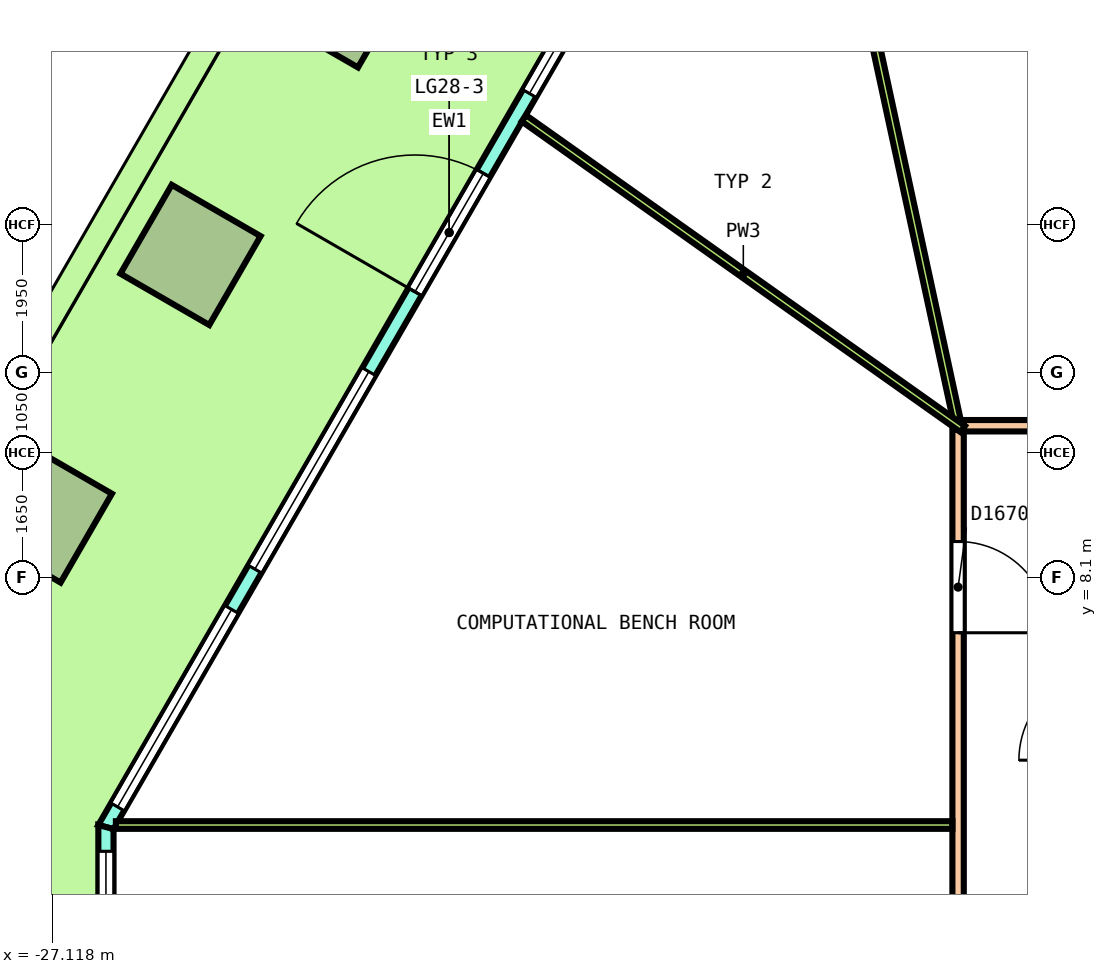
"""IFC4 building model, lengths in metres.
Left out: names, types, materials, properties, quantities, classifications, styles, units other than length and angle.
Written with IfcOpenShell. Run it as: python <this file> out.ifc"""

import sys

from ifc_helpers import new_model, si_unit, direction, frame, frame_2d, origin, origin_2d, place, context, subcontext, project, spatial, polyline, rectangle, outline, extrude, element, fill, save


model = new_model("IFC4")
c1 = context("Model", 3, precision=1e-05, world=origin(), true_north=direction((0.0, 1.0)))
c2 = subcontext(c1, "Body", "Model", "MODEL_VIEW")
j1 = project(units=[si_unit("LENGTHUNIT", "METRE"), si_unit("PLANEANGLEUNIT", "RADIAN")], contexts=[c1])
p1 = place(None, origin())
s1 = spatial("IfcSite", under=j1, at=p1, CompositionType="ELEMENT")
p2 = place(p1, origin())
s2 = spatial("IfcBuilding", under=s1, at=p2, CompositionType="ELEMENT")
p3 = place(p2, frame((0.0, 0.0, 130.8)))
s3 = spatial("IfcBuildingStorey", under=s2, at=p3, CompositionType="ELEMENT", Elevation=130.8)
for number, where, z_axis, x_axis in (
    (1, (-23.342, 15.736, 0.0), (0.0, 0.0, 1.0), (-0.5, -0.866, 0.0)),
    (2, (-25.299, 12.347, 0.0), (0.0, 0.0, 1.0), (-0.5, -0.866, 0.0)),
    (3, (-27.255, 8.959, 0.0), (0.0, 0.0, 1.0), (-0.5, -0.866, 0.0)),
):
    element("IfcColumn", number, at=place(p3, frame(where, z_axis=z_axis, x_axis=x_axis)), inside=s3, PredefinedType="COLUMN", context=c2, shape_type="SweptSolid", body=[
        extrude(rectangle(XDim=1.35, YDim=1.35, at=origin_2d()), origin(), (0.0, 0.0, 1.0), 4.04),
    ])
p4 = place(p3, frame((-17.38, 20.463, 0.0), z_axis=(0.0, 0.0, 1.0), x_axis=(-0.500000137386, -0.866025324465, 0.0)))
e4 = element("IfcWall", 4, at=p4, inside=s3, PredefinedType="SOLIDWALL", context=c2, shape_type="SweptSolid", body=[
    extrude(outline(polyline([(-0.027, -0.1), (0.979, -0.1), (1.986, -0.1), (2.992, -0.1), (3.999, -0.1), (5.005, -0.1), (6.012, -0.1), (7.018, -0.1), (8.025, -0.1), (9.031, -0.1), (10.038, -0.1), (11.044, -0.1), (12.051, -0.1), (13.057, -0.1), (14.063, -0.1), (15.07, -0.1), (16.076, -0.1), (17.083, -0.1), (18.089, -0.1), (18.036, 0.1), (17.035, 0.1), (16.035, 0.1), (15.034, 0.1), (14.034, 0.1), (13.033, 0.1), (12.033, 0.1), (11.032, 0.1), (10.032, 0.1), (9.031, 0.1), (8.031, 0.1), (7.03, 0.1), (6.03, 0.1), (5.029, 0.1), (4.029, 0.1), (3.028, 0.1), (2.028, 0.1), (1.027, 0.1), (0.027, 0.1), (-0.027, -0.1)])), origin(), (0.0, 0.0, 1.0), 4.1),
])
p5 = place(p4, frame((0.306, 0.0, 0.1)))
e5 = element("IfcOpeningElement", 5, at=p5, cuts=e4, PredefinedType="OPENING", context=c2, shape_type="SweptSolid", body=[
    extrude(rectangle(XDim=3.0, YDim=2.9, at=frame_2d((1.5, 1.45))), frame((0.0, 0.11, 0.0), z_axis=(0.0, -1.0, 0.0), x_axis=(1.0, 0.0, 0.0)), (0.0, 0.0, 1.0), 0.22),
])
p6 = place(p4, frame((3.919, 0.0, 0.1)))
e6 = element("IfcOpeningElement", 6, at=p6, cuts=e4, PredefinedType="OPENING", context=c2, shape_type="SweptSolid", body=[
    extrude(rectangle(XDim=3.0, YDim=2.9, at=frame_2d((1.5, 1.45))), frame((0.0, 0.11, 0.0), z_axis=(0.0, -1.0, 0.0), x_axis=(1.0, 0.0, 0.0)), (0.0, 0.0, 1.0), 0.22),
])
p7 = place(p4, frame((8.131, 0.0, 0.0)))
e7 = element("IfcOpeningElement", 7, at=p7, cuts=e4, PredefinedType="OPENING", context=c2, shape_type="SweptSolid", body=[
    extrude(rectangle(XDim=1.8, YDim=2.4, at=frame_2d((0.9, 1.2))), frame((0.0, 0.11, 0.0), z_axis=(0.0, -1.0, 0.0), x_axis=(1.0, 0.0, 0.0)), (0.0, 0.0, 1.0), 0.22),
])
p8 = place(p4, frame((8.131, 0.0, 2.55)))
e8 = element("IfcOpeningElement", 8, at=p8, cuts=e4, PredefinedType="OPENING", context=c2, shape_type="SweptSolid", body=[
    extrude(rectangle(XDim=1.8, YDim=0.45, at=frame_2d((0.9, 0.225))), frame((0.0, 0.11, 0.0), z_axis=(0.0, -1.0, 0.0), x_axis=(1.0, 0.0, 0.0)), (0.0, 0.0, 1.0), 0.22),
])
p9 = place(p4, frame((11.144, 0.0, 0.1)))
e9 = element("IfcOpeningElement", 9, at=p9, cuts=e4, PredefinedType="OPENING", context=c2, shape_type="SweptSolid", body=[
    extrude(rectangle(XDim=3.0, YDim=2.9, at=frame_2d((1.5, 1.45))), frame((0.0, 0.11, 0.0), z_axis=(0.0, -1.0, 0.0), x_axis=(1.0, 0.0, 0.0)), (0.0, 0.0, 1.0), 0.22),
])
p10 = place(p4, frame((14.756, 0.0, 0.1)))
e10 = element("IfcOpeningElement", 10, at=p10, cuts=e4, PredefinedType="OPENING", context=c2, shape_type="SweptSolid", body=[
    extrude(rectangle(XDim=3.0, YDim=2.9, at=frame_2d((1.5, 1.45))), frame((0.0, 0.11, 0.0), z_axis=(0.0, -1.0, 0.0), x_axis=(1.0, 0.0, 0.0)), (0.0, 0.0, 1.0), 0.22),
])
p11 = place(p3, frame((-26.411, 4.82, 0.0), z_axis=(0.0, 0.0, 1.0), x_axis=(0.0, -1.0, 0.0)))
e11 = element("IfcWall", 11, at=p11, inside=s3, PredefinedType="SOLIDWALL", context=c2, shape_type="SweptSolid", body=[
    extrude(outline(polyline([(-0.027, -0.1), (1.128, -0.1), (2.283, -0.1), (3.438, -0.1), (4.592, -0.1), (5.747, -0.1), (6.902, -0.1), (6.848, 0.1), (5.711, 0.1), (4.574, 0.1), (3.438, 0.1), (2.301, 0.1), (1.164, 0.1), (0.027, 0.1), (-0.027, -0.1)])), origin(), (0.0, 0.0, 1.0), 4.1),
])
p12 = place(p11, frame((0.319, 0.0, 0.1)))
e12 = element("IfcOpeningElement", 12, at=p12, cuts=e11, PredefinedType="OPENING", context=c2, shape_type="SweptSolid", body=[
    extrude(rectangle(XDim=2.8, YDim=2.9, at=frame_2d((1.4, 1.45))), frame((0.0, 0.11, 0.0), z_axis=(0.0, -1.0, 0.0), x_axis=(1.0, 0.0, 0.0)), (0.0, 0.0, 1.0), 0.22),
])
p13 = place(p11, frame((3.756, 0.0, 0.1)))
e13 = element("IfcOpeningElement", 13, at=p13, cuts=e11, PredefinedType="OPENING", context=c2, shape_type="SweptSolid", body=[
    extrude(rectangle(XDim=2.8, YDim=2.9, at=frame_2d((1.4, 1.45))), frame((0.0, 0.11, 0.0), z_axis=(0.0, -1.0, 0.0), x_axis=(1.0, 0.0, 0.0)), (0.0, 0.0, 1.0), 0.22),
])
p14 = place(p3, frame((-15.125, 10.1, 0.0), z_axis=(0.0, 0.0, 1.0), x_axis=(1.0, 0.0, 0.0)))
e14 = element("IfcWall", 14, at=p14, inside=s3, PredefinedType="PARTITIONING", context=c2, shape_type="SweptSolid", body=[
    extrude(rectangle(XDim=30.25, YDim=0.15, at=frame_2d((15.125, 0.0))), origin(), (0.0, 0.0, 1.0), 3.05),
])
p15 = place(p14, frame((16.895, 0.0, 0.0)))
e15 = element("IfcOpeningElement", 15, at=p15, cuts=e14, PredefinedType="OPENING", context=c2, shape_type="SweptSolid", body=[
    extrude(rectangle(XDim=1.2, YDim=2.1, at=frame_2d((0.6, 1.05))), frame((0.0, 0.085, 0.0), z_axis=(0.0, -1.0, 0.0), x_axis=(1.0, 0.0, 0.0)), (0.0, 0.0, 1.0), 0.17),
])
p16 = place(p14, frame((6.564, 0.0, 0.0)))
e16 = element("IfcOpeningElement", 16, at=p16, cuts=e14, PredefinedType="OPENING", context=c2, shape_type="SweptSolid", body=[
    extrude(rectangle(XDim=1.2, YDim=2.1, at=frame_2d((0.6, 1.05))), frame((0.0, 0.085, 0.0), z_axis=(0.0, -1.0, 0.0), x_axis=(1.0, 0.0, 0.0)), (0.0, 0.0, 1.0), 0.17),
])
p17 = place(p14, frame((1.476, 0.0, 0.0)))
e17 = element("IfcOpeningElement", 17, at=p17, cuts=e14, PredefinedType="OPENING", context=c2, shape_type="SweptSolid", body=[
    extrude(rectangle(XDim=1.2, YDim=2.1, at=frame_2d((0.6, 1.05))), frame((0.0, 0.085, 0.0), z_axis=(0.0, -1.0, 0.0), x_axis=(1.0, 0.0, 0.0)), (0.0, 0.0, 1.0), 0.17),
])
p18 = place(p3, frame((-15.2, 0.426, 0.0), z_axis=(0.0, 0.0, 1.0), x_axis=(0.0, 1.0, 0.0)))
e18 = element("IfcWall", 18, at=p18, inside=s3, PredefinedType="PARTITIONING", context=c2, shape_type="SweptSolid", body=[
    extrude(rectangle(XDim=9.624, YDim=0.15, at=frame_2d((4.812, 0.0))), origin(), (0.0, 0.0, 1.0), 3.05),
])
p19 = place(p18, frame((6.951, 0.0, 0.0)))
e19 = element("IfcOpeningElement", 19, at=p19, cuts=e18, PredefinedType="OPENING", context=c2, shape_type="SweptSolid", body=[
    extrude(rectangle(XDim=1.2, YDim=2.1, at=frame_2d((0.6, 1.05))), frame((0.0, 0.085, 0.0), z_axis=(0.0, -1.0, 0.0), x_axis=(1.0, 0.0, 0.0)), (0.0, 0.0, 1.0), 0.17),
])
p20 = place(p3, frame((-17.39, 20.245, 0.0), z_axis=(0.0, 0.0, 1.0), x_axis=(0.211012362952, -0.977483392535, 0.0)))
e20 = element("IfcWall", 20, at=p20, inside=s3, PredefinedType="PARTITIONING", context=c2, shape_type="SweptSolid", body=[
    extrude(rectangle(XDim=10.329, YDim=0.1, at=frame_2d((5.164, 0.0))), origin(), (0.0, 0.0, 1.0), 3.05),
])
p21 = place(p20, frame((3.387, 0.0, 0.0)))
e21 = element("IfcOpeningElement", 21, at=p21, cuts=e20, PredefinedType="OPENING", context=c2, shape_type="SweptSolid", body=[
    extrude(rectangle(XDim=1.0, YDim=2.1, at=frame_2d((0.5, 1.05))), frame((0.0, 0.06, 0.0), z_axis=(0.0, -1.0, 0.0), x_axis=(1.0, 0.0, 0.0)), (0.0, 0.0, 1.0), 0.12),
])
p22 = place(p3, frame((-20.912, 14.144, 0.0), z_axis=(0.0, 0.0, 1.0), x_axis=(0.816149265307, -0.577841134516, 0.0)))
e22 = element("IfcWall", 22, at=p22, inside=s3, PredefinedType="PARTITIONING", context=c2, shape_type="SweptSolid", body=[
    extrude(rectangle(XDim=7.074, YDim=0.1, at=frame_2d((3.537, 0.0))), origin(), (0.0, 0.0, 1.0), 3.05),
])
p23 = place(p3, frame((-26.28, 4.847, 0.0), z_axis=(0.0, 0.0, 1.0), x_axis=(1.0, 0.0, 0.0)))
e23 = element("IfcWall", 23, at=p23, inside=s3, PredefinedType="PARTITIONING", context=c2, shape_type="SweptSolid", body=[
    extrude(rectangle(XDim=11.005, YDim=0.1, at=frame_2d((5.503, 0.0))), origin(), (0.0, 0.0, 1.0), 3.05),
])
p24 = place(p6, origin())
e24 = element("IfcWindow", 24, at=p24, inside=s3, PartitioningType="SINGLE_PANEL", PredefinedType="WINDOW", context=c2, shape_type="SweptSolid", body=[
    extrude(rectangle(XDim=3.0, YDim=2.9, at=frame_2d((1.5, 1.45))), frame((0.0, 0.03, 0.0), z_axis=(0.0, -1.0, 0.0), x_axis=(1.0, 0.0, 0.0)), (0.0, 0.0, 1.0), 0.06),
])
fill(e6, e24)
p25 = place(p7, origin())
e25 = element("IfcDoor", 25, at=p25, inside=s3, OperationType="DOUBLE_DOOR_SINGLE_SWING", PredefinedType="DOOR", context=c2, shape_type="SweptSolid", body=[
    extrude(rectangle(XDim=1.8, YDim=2.4, at=frame_2d((0.9, 1.2))), frame((0.0, 0.025, 0.0), z_axis=(0.0, -1.0, 0.0), x_axis=(1.0, 0.0, 0.0)), (0.0, 0.0, 1.0), 0.05),
])
fill(e7, e25)
p26 = place(p8, origin())
e26 = element("IfcWindow", 26, at=p26, inside=s3, PartitioningType="SINGLE_PANEL", PredefinedType="WINDOW", context=c2, shape_type="SweptSolid", body=[
    extrude(rectangle(XDim=1.8, YDim=0.45, at=frame_2d((0.9, 0.225))), frame((0.0, 0.03, 0.0), z_axis=(0.0, -1.0, 0.0), x_axis=(1.0, 0.0, 0.0)), (0.0, 0.0, 1.0), 0.06),
])
fill(e8, e26)
p27 = place(p9, origin())
e27 = element("IfcWindow", 27, at=p27, inside=s3, PartitioningType="SINGLE_PANEL", PredefinedType="WINDOW", context=c2, shape_type="SweptSolid", body=[
    extrude(rectangle(XDim=3.0, YDim=2.9, at=frame_2d((1.5, 1.45))), frame((0.0, 0.03, 0.0), z_axis=(0.0, -1.0, 0.0), x_axis=(1.0, 0.0, 0.0)), (0.0, 0.0, 1.0), 0.06),
])
fill(e9, e27)
p28 = place(p10, origin())
e28 = element("IfcWindow", 28, at=p28, inside=s3, PartitioningType="SINGLE_PANEL", PredefinedType="WINDOW", context=c2, shape_type="SweptSolid", body=[
    extrude(rectangle(XDim=3.0, YDim=2.9, at=frame_2d((1.5, 1.45))), frame((0.0, 0.03, 0.0), z_axis=(0.0, -1.0, 0.0), x_axis=(1.0, 0.0, 0.0)), (0.0, 0.0, 1.0), 0.06),
])
fill(e10, e28)
p29 = place(p12, origin())
e29 = element("IfcWindow", 29, at=p29, inside=s3, PartitioningType="SINGLE_PANEL", PredefinedType="WINDOW", context=c2, shape_type="SweptSolid", body=[
    extrude(rectangle(XDim=2.8, YDim=2.9, at=frame_2d((1.4, 1.45))), frame((0.0, 0.03, 0.0), z_axis=(0.0, -1.0, 0.0), x_axis=(1.0, 0.0, 0.0)), (0.0, 0.0, 1.0), 0.06),
])
fill(e12, e29)
p30 = place(p19, origin())
e30 = element("IfcDoor", 30, at=p30, inside=s3, OperationType="DOUBLE_DOOR_SINGLE_SWING", PredefinedType="DOOR", context=c2, shape_type="SweptSolid", body=[
    extrude(rectangle(XDim=1.2, YDim=2.1, at=frame_2d((0.6, 1.05))), frame((0.0, 0.025, 0.0), z_axis=(0.0, -1.0, 0.0), x_axis=(1.0, 0.0, 0.0)), (0.0, 0.0, 1.0), 0.05),
])
fill(e19, e30)
save(model, sys.argv[1])
